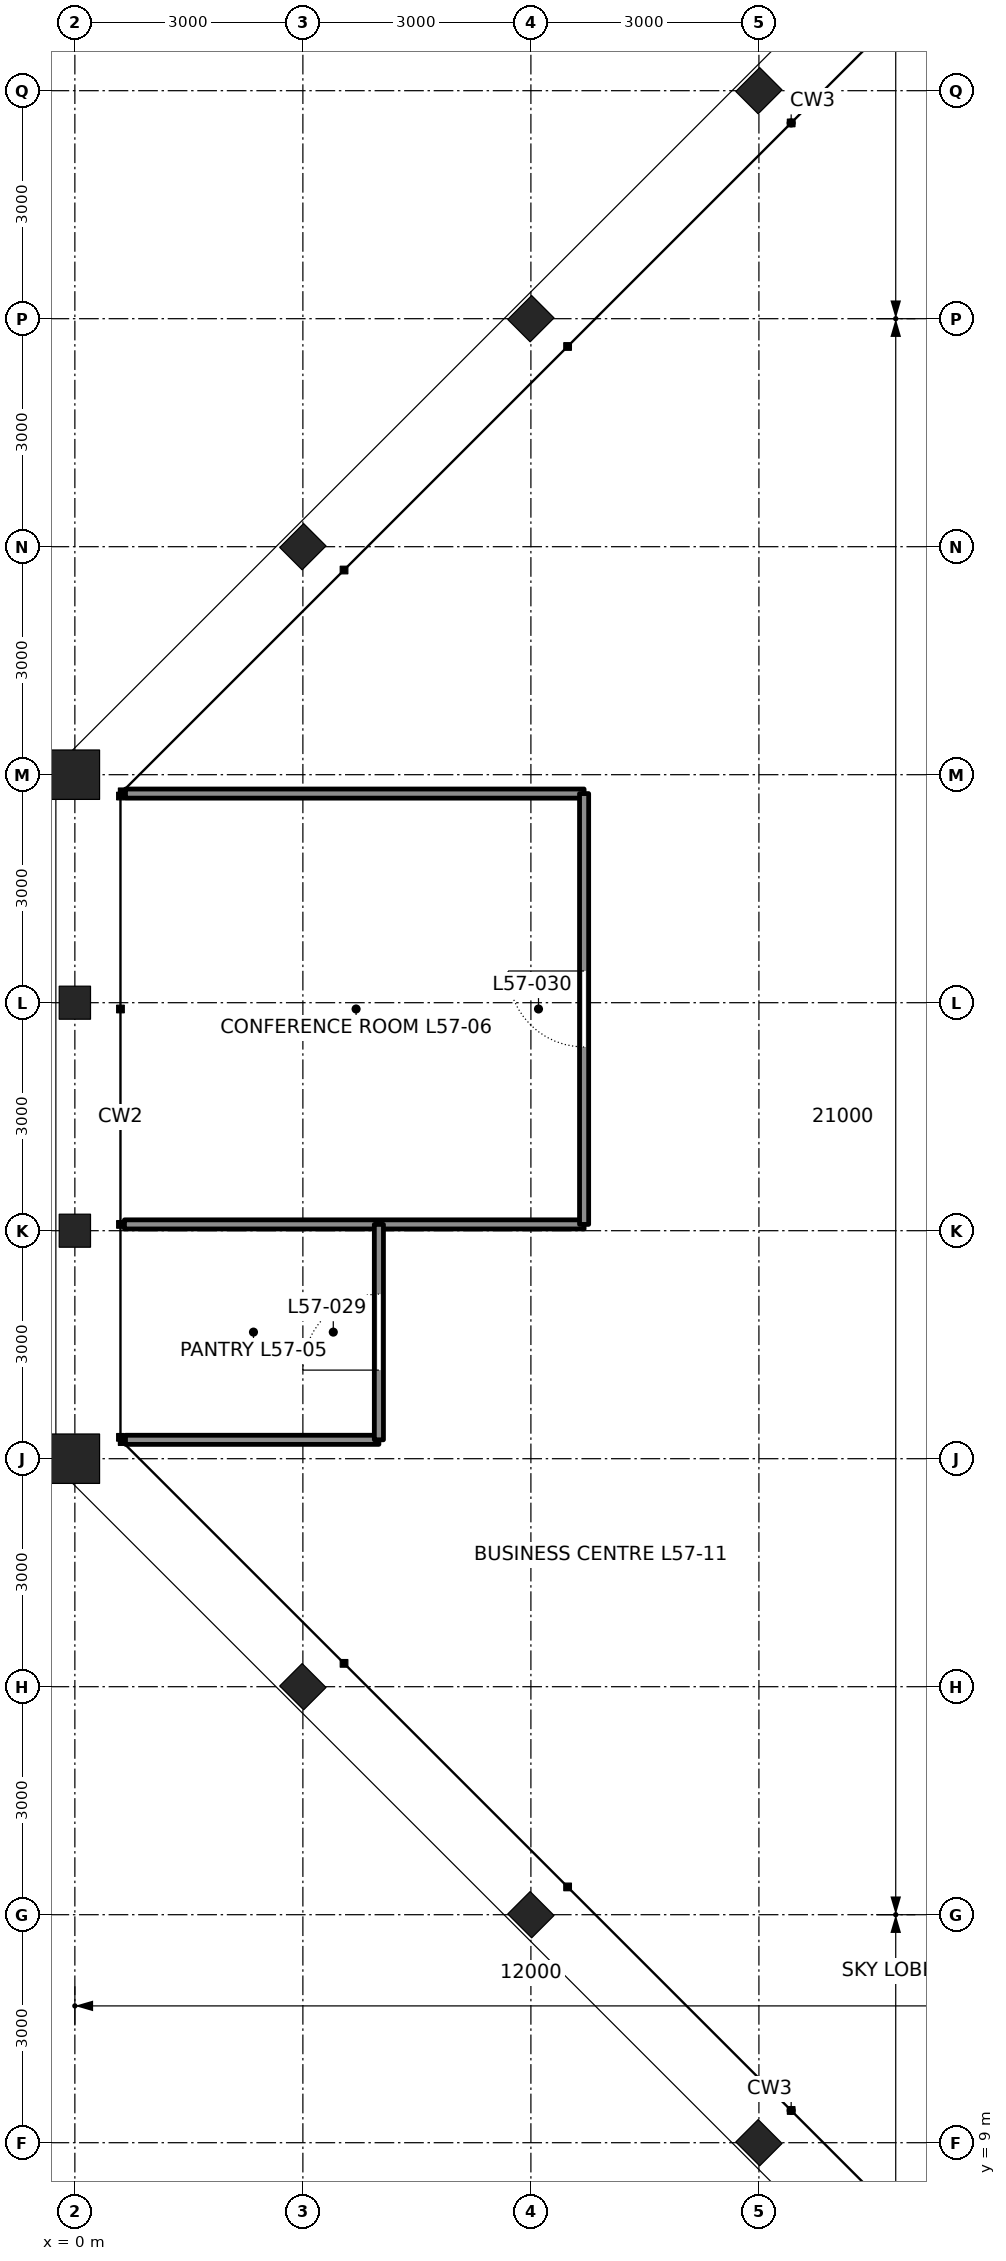
"""IFC4 building model, lengths in metres.
Left out: names, types, materials, properties, quantities, classifications, styles, units other than length and angle.
Written with IfcOpenShell. Run it as: python <this file> out.ifc"""

import sys

from ifc_helpers import new_model, si_unit, direction, frame, frame_2d, origin, origin_2d, place, context, subcontext, project, spatial, rectangle, hollow_rectangle, i_section, extrude, element, fill, save


model = new_model("IFC4")
c1 = context("Model", 3, precision=1e-05, world=origin(), true_north=direction((0.0, 1.0)))
c2 = subcontext(c1, "Body", "Model", "MODEL_VIEW")
j1 = project(units=[si_unit("LENGTHUNIT", "METRE"), si_unit("PLANEANGLEUNIT", "RADIAN")], contexts=[c1])
p1 = place(None, origin())
s1 = spatial("IfcSite", under=j1, at=p1, CompositionType="ELEMENT")
p2 = place(p1, origin())
s2 = spatial("IfcBuilding", under=s1, at=p2, CompositionType="ELEMENT")
p3 = place(p2, frame((0.0, 0.0, 257.7)))
s3 = spatial("IfcBuildingStorey", under=s2, at=p3, CompositionType="ELEMENT", Elevation=257.7)
for number, where, z_axis, x_axis in (
    (1, (9.0, 36.0, -0.91), (0.0, 0.0, 1.0), (-0.707, 0.707, 0.0)),
    (2, (6.0, 33.0, -0.91), (0.0, 0.0, 1.0), (-0.707, 0.707, 0.0)),
    (3, (3.0, 30.0, -0.91), (0.0, 0.0, 1.0), (-0.707, 0.707, 0.0)),
):
    element("IfcColumn", number, at=place(p3, frame(where, z_axis=z_axis, x_axis=x_axis)), inside=s3, PredefinedType="COLUMN", context=c2, shape_type="SweptSolid", body=[
        extrude(i_section(OverallWidth=0.417, OverallDepth=0.445, WebThickness=0.039, FlangeThickness=0.063, at=origin_2d()), origin(), (0.0, 0.0, 1.0), 5.41),
    ])
p4 = place(p3, frame((0.0, 27.0, 0.0), z_axis=(0.0, 0.0, 1.0), x_axis=(-1.0, 0.0, 0.0)))
e4 = element("IfcColumn", 4, at=p4, inside=s3, PredefinedType="COLUMN", context=c2, shape_type="SweptSolid", body=[
    extrude(hollow_rectangle(XDim=0.65, YDim=0.65, WallThickness=0.065, at=origin_2d()), origin(), (0.0, 0.0, 1.0), 4.5),
])
for number, where, z_axis, x_axis in (
    (5, (0.0, 24.0, 0.0), (0.0, 0.0, 1.0), (-1.0, 0.0, 0.0)),
    (6, (0.0, 21.0, 0.0), (0.0, 0.0, 1.0), (-1.0, 0.0, 0.0)),
):
    element("IfcColumn", number, at=place(p3, frame(where, z_axis=z_axis, x_axis=x_axis)), inside=s3, PredefinedType="COLUMN", context=c2, shape_type="SweptSolid", body=[
        extrude(i_section(OverallWidth=0.411, OverallDepth=0.434, WebThickness=0.036, FlangeThickness=0.057, at=origin_2d()), origin(), (0.0, 0.0, 1.0), 4.5),
    ])
p5 = place(p3, frame((0.0, 18.0, 0.0), z_axis=(0.0, 0.0, 1.0), x_axis=(-1.0, 0.0, 0.0)))
e7 = element("IfcColumn", 7, at=p5, inside=s3, PredefinedType="COLUMN", context=c2, shape_type="SweptSolid", body=[
    extrude(hollow_rectangle(XDim=0.65, YDim=0.65, WallThickness=0.065, at=origin_2d()), origin(), (0.0, 0.0, 1.0), 4.5),
])
for number, where, z_axis, x_axis in (
    (8, (3.0, 15.0, 0.0), (0.0, 0.0, 1.0), (-0.707, -0.707, 0.0)),
    (9, (6.0, 12.0, 0.0), (0.0, 0.0, 1.0), (-0.707, -0.707, 0.0)),
    (10, (9.0, 9.0, 0.0), (0.0, 0.0, 1.0), (-0.707, -0.707, 0.0)),
):
    element("IfcColumn", number, at=place(p3, frame(where, z_axis=z_axis, x_axis=x_axis)), inside=s3, PredefinedType="COLUMN", context=c2, shape_type="SweptSolid", body=[
        extrude(i_section(OverallWidth=0.417, OverallDepth=0.445, WebThickness=0.039, FlangeThickness=0.063, at=origin_2d()), origin(), (0.0, 0.0, 1.0), 4.5),
    ])
p6 = place(p3, frame((0.666, 18.249, 0.0), z_axis=(0.0, 0.0, 1.0), x_axis=(1.0, 0.0, 0.0)))
e11 = element("IfcWall", 11, at=p6, inside=s3, PredefinedType="PARTITIONING", context=c2, shape_type="SweptSolid", body=[
    extrude(rectangle(XDim=3.334, YDim=0.12, at=frame_2d((1.667, 0.0))), origin(), (0.0, 0.0, 1.0), 4.34),
])
p7 = place(p3, frame((0.653, 21.083, 0.0), z_axis=(0.0, 0.0, 1.0), x_axis=(1.0, 0.0, 0.0)))
e12 = element("IfcWall", 12, at=p7, inside=s3, PredefinedType="PARTITIONING", context=c2, shape_type="SweptSolid", body=[
    extrude(rectangle(XDim=6.047, YDim=0.12, at=frame_2d((3.024, 0.0))), origin(), (0.0, 0.0, 1.0), 3.647),
])
p8 = place(p3, frame((0.666, 26.751, 0.0), z_axis=(0.0, 0.0, 1.0), x_axis=(1.0, 0.0, 0.0)))
e13 = element("IfcWall", 13, at=p8, inside=s3, PredefinedType="PARTITIONING", context=c2, shape_type="SweptSolid", body=[
    extrude(rectangle(XDim=6.034, YDim=0.12, at=frame_2d((3.017, 0.0))), origin(), (0.0, 0.0, 1.0), 4.34),
])
p9 = place(p3, frame((4.0, 18.249, 0.0), z_axis=(0.0, 0.0, 1.0), x_axis=(0.0, 1.0, 0.0)))
e14 = element("IfcWall", 14, at=p9, inside=s3, PredefinedType="PARTITIONING", context=c2, shape_type="SweptSolid", body=[
    extrude(rectangle(XDim=2.834, YDim=0.12, at=frame_2d((1.417, 0.0))), origin(), (0.0, 0.0, 1.0), 4.34),
])
p10 = place(p9, frame((0.917, 0.0, 0.0)))
e15 = element("IfcOpeningElement", 15, at=p10, cuts=e14, PredefinedType="OPENING", context=c2, shape_type="SweptSolid", body=[
    extrude(rectangle(XDim=1.0, YDim=2.4, at=frame_2d((0.5, 1.2))), frame((0.0, 0.07, 0.0), z_axis=(0.0, -1.0, 0.0), x_axis=(1.0, 0.0, 0.0)), (0.0, 0.0, 1.0), 0.14),
])
p11 = place(p3, frame((6.7, 21.083, 0.0), z_axis=(0.0, 0.0, 1.0), x_axis=(0.0, 1.0, 0.0)))
e16 = element("IfcWall", 16, at=p11, inside=s3, PredefinedType="PARTITIONING", context=c2, shape_type="SweptSolid", body=[
    extrude(rectangle(XDim=5.669, YDim=0.12, at=frame_2d((2.834, 0.0))), origin(), (0.0, 0.0, 1.0), 4.34),
])
p12 = place(p11, frame((2.334, 0.0, 0.0)))
e17 = element("IfcOpeningElement", 17, at=p12, cuts=e16, PredefinedType="OPENING", context=c2, shape_type="SweptSolid", body=[
    extrude(rectangle(XDim=1.0, YDim=2.4, at=frame_2d((0.5, 1.2))), frame((0.0, 0.07, 0.0), z_axis=(0.0, -1.0, 0.0), x_axis=(1.0, 0.0, 0.0)), (0.0, 0.0, 1.0), 0.14),
])
p13 = place(p10, origin())
e18 = element("IfcDoor", 18, at=p13, inside=s3, OperationType="SINGLE_SWING_LEFT", PredefinedType="DOOR", context=c2, shape_type="SweptSolid", body=[
    extrude(rectangle(XDim=1.0, YDim=2.4, at=frame_2d((0.5, 1.2))), frame((0.0, 0.025, 0.0), z_axis=(0.0, -1.0, 0.0), x_axis=(1.0, 0.0, 0.0)), (0.0, 0.0, 1.0), 0.05),
])
fill(e15, e18)
p14 = place(p12, origin())
e19 = element("IfcDoor", 19, at=p14, inside=s3, OperationType="SINGLE_SWING_RIGHT", PredefinedType="DOOR", context=c2, shape_type="SweptSolid", body=[
    extrude(rectangle(XDim=1.0, YDim=2.4, at=frame_2d((0.5, 1.2))), frame((0.0, 0.025, 0.0), z_axis=(0.0, -1.0, 0.0), x_axis=(1.0, 0.0, 0.0)), (0.0, 0.0, 1.0), 0.05),
])
fill(e17, e19)
save(model, sys.argv[1])
